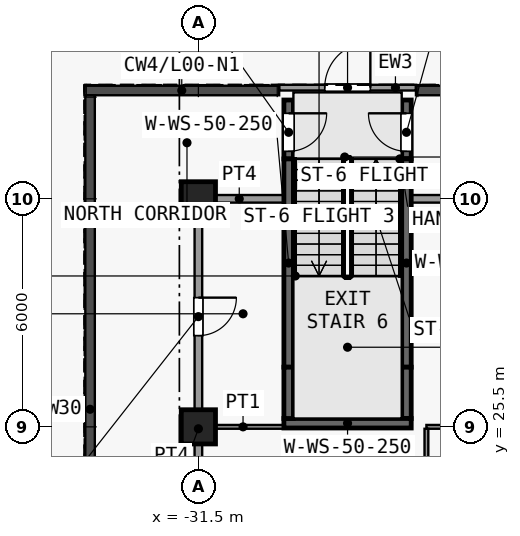
"""IFC4 building model, lengths in metres.
Left out: names, types, materials, properties, quantities, classifications, styles, units other than length and angle.
Written with IfcOpenShell. Run it as: python <this file> out.ifc"""

import sys

from ifc_helpers import new_model, si_unit, direction, frame, frame_2d, origin, origin_2d, place, context, subcontext, project, spatial, rectangle, extrude, element, fill, save


model = new_model("IFC4")
c1 = context("Model", 3, precision=1e-05, world=origin(), true_north=direction((0.0, 1.0)))
c2 = subcontext(c1, "Body", "Model", "MODEL_VIEW")
j1 = project(units=[si_unit("LENGTHUNIT", "METRE"), si_unit("PLANEANGLEUNIT", "RADIAN")], contexts=[c1])
p1 = place(None, origin())
s1 = spatial("IfcSite", under=j1, at=p1, CompositionType="ELEMENT")
p2 = place(p1, origin())
s2 = spatial("IfcBuilding", under=s1, at=p2, CompositionType="ELEMENT")
p3 = place(p2, origin())
s3 = spatial("IfcBuildingStorey", under=s2, at=p3, CompositionType="ELEMENT", Elevation=0.0)
for number, where, z_axis, x_axis in (
    (1, (-31.5, 25.5, 0.0), (0.0, 0.0, 1.0), (1.0, 0.0, 0.0)),
    (2, (-31.5, 31.5, 0.0), (0.0, 0.0, 1.0), (1.0, 0.0, 0.0)),
):
    element("IfcColumn", number, at=place(p3, frame(where, z_axis=z_axis, x_axis=x_axis)), inside=s3, PredefinedType="COLUMN", context=c2, shape_type="SweptSolid", body=[
        extrude(rectangle(XDim=0.9, YDim=0.9, at=origin_2d()), origin(), (0.0, 0.0, 1.0), 8.0),
    ])
p4 = place(p3, frame((-29.375, 34.425, 0.0), z_axis=(0.0, 0.0, 1.0), x_axis=(1.0, 0.0, 0.0)))
e3 = element("IfcWall", 3, at=p4, inside=s3, PredefinedType="SOLIDWALL", context=c2, shape_type="SweptSolid", body=[
    extrude(rectangle(XDim=3.6, YDim=0.15, at=frame_2d((1.8, 0.0))), origin(), (0.0, 0.0, 1.0), 7.65),
])
p5 = place(p4, frame((1.2, 0.0, 0.0)))
e4 = element("IfcOpeningElement", 4, at=p5, cuts=e3, PredefinedType="OPENING", context=c2, shape_type="SweptSolid", body=[
    extrude(rectangle(XDim=1.2, YDim=2.4, at=frame_2d((0.6, 1.2))), frame((0.0, 0.085, 0.0), z_axis=(0.0, -1.0, 0.0), x_axis=(1.0, 0.0, 0.0)), (0.0, 0.0, 1.0), 0.17),
])
p6 = place(p3, frame((-29.125, 34.1, 0.0), z_axis=(0.0, 0.0, 1.0), x_axis=(0.0, -1.0, 0.0)))
e5 = element("IfcWall", 5, at=p6, inside=s3, PredefinedType="SHEAR", context=c2, shape_type="SweptSolid", body=[
    extrude(rectangle(XDim=1.55, YDim=0.25, at=frame_2d((0.775, 0.0))), origin(), (0.0, 0.0, 1.0), 7.65),
])
p7 = place(p6, frame((0.35, 0.0, 0.0)))
e6 = element("IfcOpeningElement", 6, at=p7, cuts=e5, PredefinedType="OPENING", context=c2, shape_type="SweptSolid", body=[
    extrude(rectangle(XDim=1.0, YDim=2.1, at=frame_2d((0.5, 1.05))), frame((0.0, 0.135, 0.0), z_axis=(0.0, -1.0, 0.0), x_axis=(1.0, 0.0, 0.0)), (0.0, 0.0, 1.0), 0.27),
])
p8 = place(p3, frame((-29.125, 27.07, 0.0), z_axis=(0.0, 0.0, 1.0), x_axis=(0.0, 1.0, 0.0)))
e7 = element("IfcWall", 7, at=p8, inside=s3, PredefinedType="SHEAR", context=c2, shape_type="SweptSolid", body=[
    extrude(rectangle(XDim=5.48, YDim=0.25, at=frame_2d((2.74, 0.0))), origin(), (0.0, 0.0, 1.0), 7.65),
])
p9 = place(p3, frame((-29.125, 25.72, 0.0), z_axis=(0.0, 0.0, 1.0), x_axis=(0.0, 1.0, 0.0)))
e8 = element("IfcWall", 8, at=p9, inside=s3, PredefinedType="SHEAR", context=c2, shape_type="SweptSolid", body=[
    extrude(rectangle(XDim=1.35, YDim=0.25, at=frame_2d((0.675, 0.0))), origin(), (0.0, 0.0, 1.0), 7.65),
])
p10 = place(p3, frame((-26.025, 32.55, 0.0), z_axis=(0.0, 0.0, 1.0), x_axis=(0.0, 1.0, 0.0)))
e9 = element("IfcWall", 9, at=p10, inside=s3, PredefinedType="SHEAR", context=c2, shape_type="SweptSolid", body=[
    extrude(rectangle(XDim=1.55, YDim=0.25, at=frame_2d((0.775, 0.0))), origin(), (0.0, 0.0, 1.0), 7.65),
])
p11 = place(p10, frame((0.2, 0.0, 0.0)))
e10 = element("IfcOpeningElement", 10, at=p11, cuts=e9, PredefinedType="OPENING", context=c2, shape_type="SweptSolid", body=[
    extrude(rectangle(XDim=1.0, YDim=2.1, at=frame_2d((0.5, 1.05))), frame((0.0, 0.135, 0.0), z_axis=(0.0, -1.0, 0.0), x_axis=(1.0, 0.0, 0.0)), (0.0, 0.0, 1.0), 0.27),
])
p12 = place(p3, frame((-26.025, 27.07, 0.0), z_axis=(0.0, 0.0, 1.0), x_axis=(0.0, 1.0, 0.0)))
e11 = element("IfcWall", 11, at=p12, inside=s3, PredefinedType="SHEAR", context=c2, shape_type="SweptSolid", body=[
    extrude(rectangle(XDim=5.48, YDim=0.25, at=frame_2d((2.74, 0.0))), origin(), (0.0, 0.0, 1.0), 7.65),
])
p13 = place(p3, frame((-26.025, 25.72, 0.0), z_axis=(0.0, 0.0, 1.0), x_axis=(0.0, 1.0, 0.0)))
e12 = element("IfcWall", 12, at=p13, inside=s3, PredefinedType="SHEAR", context=c2, shape_type="SweptSolid", body=[
    extrude(rectangle(XDim=1.35, YDim=0.25, at=frame_2d((0.675, 0.0))), origin(), (0.0, 0.0, 1.0), 7.65),
])
p14 = place(p3, frame((-29.25, 25.595, 0.0), z_axis=(0.0, 0.0, 1.0), x_axis=(1.0, 0.0, 0.0)))
e13 = element("IfcWall", 13, at=p14, inside=s3, PredefinedType="SHEAR", context=c2, shape_type="SweptSolid", body=[
    extrude(rectangle(XDim=3.35, YDim=0.25, at=frame_2d((1.675, 0.0))), origin(), (0.0, 0.0, 1.0), 7.65),
])
p15 = place(p3, frame((-31.4, 25.5, 0.0), z_axis=(0.0, 0.0, 1.0), x_axis=(1.0, 0.0, 0.0)))
e14 = element("IfcWall", 14, at=p15, inside=s3, PredefinedType="PARTITIONING", context=c2, shape_type="SweptSolid", body=[
    extrude(rectangle(XDim=2.15, YDim=0.1, at=frame_2d((1.075, 0.0))), origin(), (0.0, 0.0, 1.0), 7.65),
])
p16 = place(p3, frame((-25.5, 25.5, 0.0), z_axis=(0.0, 0.0, 1.0), x_axis=(1.0, 0.0, 0.0)))
e15 = element("IfcWall", 15, at=p16, inside=s3, PredefinedType="PARTITIONING", context=c2, shape_type="SweptSolid", body=[
    extrude(rectangle(XDim=48.65, YDim=0.1, at=frame_2d((24.325, 0.0))), origin(), (0.0, 0.0, 1.0), 7.65),
])
p17 = place(p3, frame((-31.6, 31.5, 0.0), z_axis=(0.0, 0.0, 1.0), x_axis=(1.0, 0.0, 0.0)))
e16 = element("IfcWall", 16, at=p17, inside=s3, PredefinedType="PARTITIONING", context=c2, shape_type="SweptSolid", body=[
    extrude(rectangle(XDim=2.35, YDim=0.2, at=frame_2d((1.175, 0.0))), origin(), (0.0, 0.0, 1.0), 7.65),
])
p18 = place(p3, frame((-25.9, 31.5, 0.0), z_axis=(0.0, 0.0, 1.0), x_axis=(1.0, 0.0, 0.0)))
e17 = element("IfcWall", 17, at=p18, inside=s3, PredefinedType="PARTITIONING", context=c2, shape_type="SweptSolid", body=[
    extrude(rectangle(XDim=49.05, YDim=0.2, at=frame_2d((24.525, 0.0))), origin(), (0.0, 0.0, 1.0), 7.65),
])
p19 = place(p18, frame((10.0, 0.0, 0.0)))
e18 = element("IfcOpeningElement", 18, at=p19, cuts=e17, PredefinedType="OPENING", context=c2, shape_type="SweptSolid", body=[
    extrude(rectangle(XDim=1.0, YDim=2.1, at=frame_2d((0.5, 1.05))), frame((0.0, 0.11, 0.0), z_axis=(0.0, -1.0, 0.0), x_axis=(1.0, 0.0, 0.0)), (0.0, 0.0, 1.0), 0.22),
])
p20 = place(p18, frame((38.7, 0.0, 0.0)))
e19 = element("IfcOpeningElement", 19, at=p20, cuts=e17, PredefinedType="OPENING", context=c2, shape_type="SweptSolid", body=[
    extrude(rectangle(XDim=1.0, YDim=2.1, at=frame_2d((0.5, 1.05))), frame((0.0, 0.11, 0.0), z_axis=(0.0, -1.0, 0.0), x_axis=(1.0, 0.0, 0.0)), (0.0, 0.0, 1.0), 0.22),
])
p21 = place(p3, frame((-31.5, 19.6, 0.0), z_axis=(0.0, 0.0, 1.0), x_axis=(0.0, 1.0, 0.0)))
e20 = element("IfcWall", 20, at=p21, inside=s3, PredefinedType="PARTITIONING", context=c2, shape_type="SweptSolid", body=[
    extrude(rectangle(XDim=11.8, YDim=0.2, at=frame_2d((5.9, 0.0))), origin(), (0.0, 0.0, 1.0), 7.65),
])
p22 = place(p21, frame((2.4, 0.0, 0.0)))
e21 = element("IfcOpeningElement", 21, at=p22, cuts=e20, PredefinedType="OPENING", context=c2, shape_type="SweptSolid", body=[
    extrude(rectangle(XDim=1.0, YDim=2.1, at=frame_2d((0.5, 1.05))), frame((0.0, 0.11, 0.0), z_axis=(0.0, -1.0, 0.0), x_axis=(1.0, 0.0, 0.0)), (0.0, 0.0, 1.0), 0.22),
])
p23 = place(p21, frame((8.3, 0.0, 0.0)))
e22 = element("IfcOpeningElement", 22, at=p23, cuts=e20, PredefinedType="OPENING", context=c2, shape_type="SweptSolid", body=[
    extrude(rectangle(XDim=1.0, YDim=2.1, at=frame_2d((0.5, 1.05))), frame((0.0, 0.11, 0.0), z_axis=(0.0, -1.0, 0.0), x_axis=(1.0, 0.0, 0.0)), (0.0, 0.0, 1.0), 0.22),
])
p24 = place(p3, frame((-25.5, 19.6, 0.0), z_axis=(0.0, 0.0, 1.0), x_axis=(0.0, 1.0, 0.0)))
e23 = element("IfcWall", 23, at=p24, inside=s3, PredefinedType="PARTITIONING", context=c2, shape_type="SweptSolid", body=[
    extrude(rectangle(XDim=5.85, YDim=0.1, at=frame_2d((2.925, 0.0))), origin(), (0.0, 0.0, 1.0), 7.65),
])
p25 = place(p5, origin())
e24 = element("IfcDoor", 24, at=p25, inside=s3, OperationType="SINGLE_SWING_RIGHT", PredefinedType="DOOR", context=c2, shape_type="SweptSolid", body=[
    extrude(rectangle(XDim=1.2, YDim=2.4, at=frame_2d((0.6, 1.2))), frame((0.0, 0.025, 0.0), z_axis=(0.0, -1.0, 0.0), x_axis=(1.0, 0.0, 0.0)), (0.0, 0.0, 1.0), 0.05),
])
fill(e4, e24)
p26 = place(p7, origin())
e25 = element("IfcDoor", 25, at=p26, inside=s3, OperationType="SINGLE_SWING_LEFT", PredefinedType="DOOR", context=c2, shape_type="SweptSolid", body=[
    extrude(rectangle(XDim=1.0, YDim=2.1, at=frame_2d((0.5, 1.05))), frame((0.0, 0.025, 0.0), z_axis=(0.0, -1.0, 0.0), x_axis=(1.0, 0.0, 0.0)), (0.0, 0.0, 1.0), 0.05),
])
fill(e6, e25)
p27 = place(p11, origin())
e26 = element("IfcDoor", 26, at=p27, inside=s3, OperationType="SINGLE_SWING_RIGHT", PredefinedType="DOOR", context=c2, shape_type="SweptSolid", body=[
    extrude(rectangle(XDim=1.0, YDim=2.1, at=frame_2d((0.5, 1.05))), frame((0.0, 0.025, 0.0), z_axis=(0.0, -1.0, 0.0), x_axis=(1.0, 0.0, 0.0)), (0.0, 0.0, 1.0), 0.05),
])
fill(e10, e26)
p28 = place(p23, origin())
e27 = element("IfcDoor", 27, at=p28, inside=s3, OperationType="SINGLE_SWING_RIGHT", PredefinedType="DOOR", context=c2, shape_type="SweptSolid", body=[
    extrude(rectangle(XDim=1.0, YDim=2.1, at=frame_2d((0.5, 1.05))), frame((0.0, 0.025, 0.0), z_axis=(0.0, -1.0, 0.0), x_axis=(1.0, 0.0, 0.0)), (0.0, 0.0, 1.0), 0.05),
])
fill(e22, e27)
save(model, sys.argv[1])
